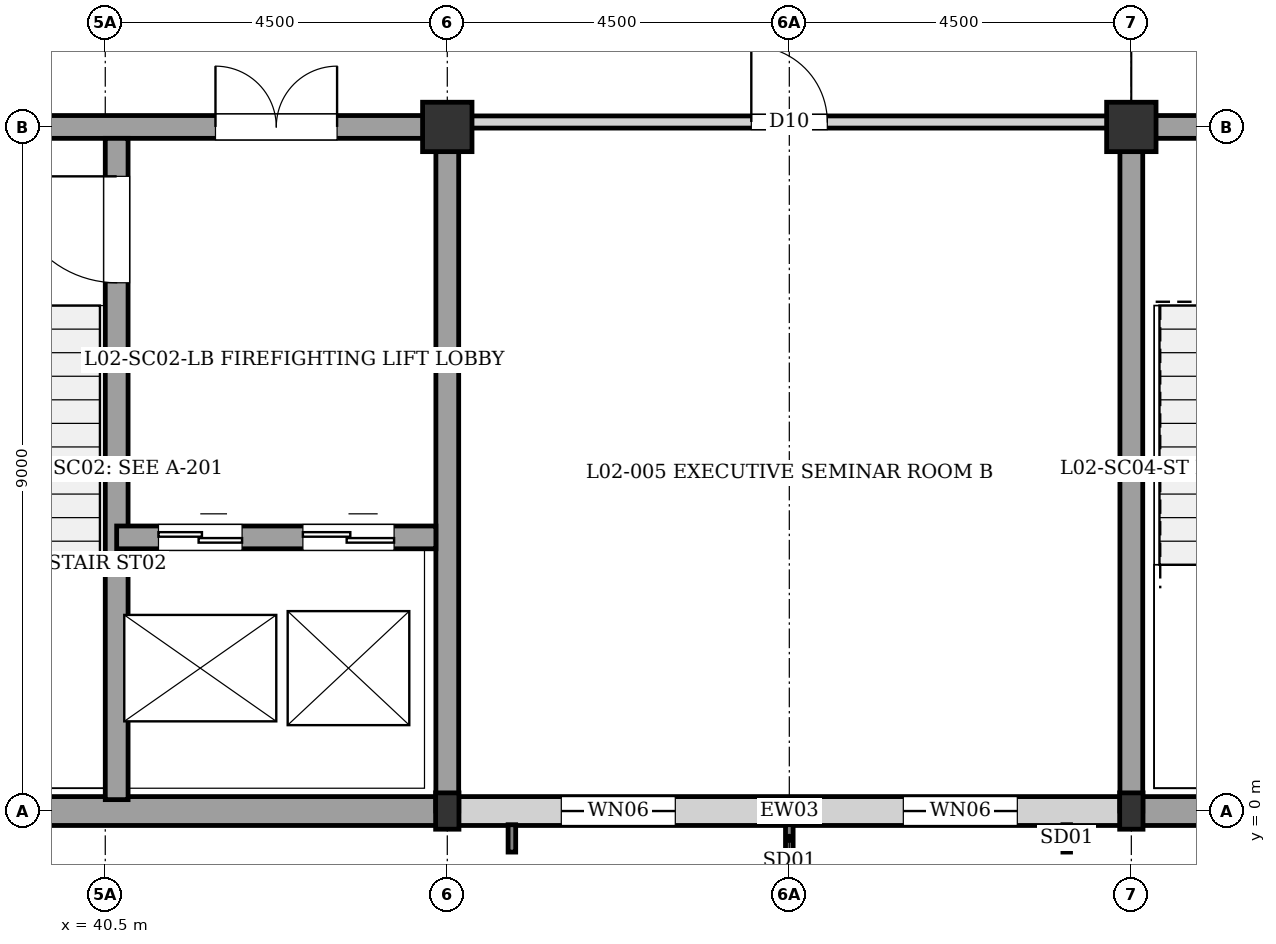
"""IFC4 building model, lengths in metres.
Left out: names, types, materials, properties, quantities, classifications, styles, units other than length and angle.
Written with IfcOpenShell. Run it as: python <this file> out.ifc"""

import sys

from ifc_helpers import new_model, si_unit, direction, frame, frame_2d, origin, origin_2d, place, context, subcontext, project, spatial, rectangle, i_section, extrude, element, fill, save


model = new_model("IFC4")
c1 = context("Model", 3, precision=1e-05, world=origin(), true_north=direction((0.0, 1.0)))
c2 = subcontext(c1, "Body", "Model", "MODEL_VIEW")
j1 = project(units=[si_unit("LENGTHUNIT", "METRE"), si_unit("PLANEANGLEUNIT", "RADIAN")], contexts=[c1])
p1 = place(None, origin())
s1 = spatial("IfcSite", under=j1, at=p1, CompositionType="ELEMENT")
p2 = place(p1, origin())
s2 = spatial("IfcBuilding", under=s1, at=p2, CompositionType="ELEMENT")
p3 = place(p2, frame((0.0, 0.0, 8.16)))
s3 = spatial("IfcBuildingStorey", under=s2, at=p3, CompositionType="ELEMENT", Elevation=8.16)
p4 = place(p3, frame((45.0, 0.0, 0.0), z_axis=(0.0, 0.0, 1.0), x_axis=(1.0, 0.0, 0.0)))
e1 = element("IfcColumn", 1, at=p4, inside=s3, PredefinedType="COLUMN", context=c2, shape_type="SweptSolid", body=[
    extrude(i_section(OverallWidth=0.307, OverallDepth=0.478, WebThickness=0.021, FlangeThickness=0.04, at=origin_2d()), origin(), (0.0, 0.0, 1.0), 3.36),
])
p5 = place(p3, frame((45.0, 9.0, 0.0), z_axis=(0.0, 0.0, 1.0), x_axis=(1.0, 0.0, 0.0)))
e2 = element("IfcColumn", 2, at=p5, inside=s3, PredefinedType="COLUMN", context=c2, shape_type="SweptSolid", body=[
    extrude(rectangle(XDim=0.65, YDim=0.65, at=origin_2d()), origin(), (0.0, 0.0, 1.0), 3.36),
])
p6 = place(p3, frame((54.0, 0.0, 0.0), z_axis=(0.0, 0.0, 1.0), x_axis=(1.0, 0.0, 0.0)))
e3 = element("IfcColumn", 3, at=p6, inside=s3, PredefinedType="COLUMN", context=c2, shape_type="SweptSolid", body=[
    extrude(i_section(OverallWidth=0.307, OverallDepth=0.478, WebThickness=0.021, FlangeThickness=0.04, at=origin_2d()), origin(), (0.0, 0.0, 1.0), 3.36),
])
p7 = place(p3, frame((54.0, 9.0, 0.0), z_axis=(0.0, 0.0, 1.0), x_axis=(1.0, 0.0, 0.0)))
e4 = element("IfcColumn", 4, at=p7, inside=s3, PredefinedType="COLUMN", context=c2, shape_type="SweptSolid", body=[
    extrude(rectangle(XDim=0.65, YDim=0.65, at=origin_2d()), origin(), (0.0, 0.0, 1.0), 3.36),
])
p8 = place(p3, frame((63.0, 0.0, 0.0), z_axis=(0.0, 0.0, 1.0), x_axis=(-1.0, 0.0, 0.0)))
e5 = element("IfcWall", 5, at=p8, inside=s3, PredefinedType="SOLIDWALL", context=c2, shape_type="SweptSolid", body=[
    extrude(rectangle(XDim=9.0, YDim=0.38, at=frame_2d((4.5, 0.0))), origin(), (0.0, 0.0, 1.0), 3.14),
])
p9 = place(p3, frame((53.87, 0.0, 0.0), z_axis=(0.0, 0.0, 1.0), x_axis=(-1.0, 0.0, 0.0)))
e6 = element("IfcWall", 6, at=p9, inside=s3, PredefinedType="SOLIDWALL", context=c2, shape_type="SweptSolid", body=[
    extrude(rectangle(XDim=8.74, YDim=0.38, at=frame_2d((4.37, 0.0))), origin(), (0.0, 0.0, 1.0), 2.8),
])
p10 = place(p9, frame((1.37, 0.0, 0.35)))
e7 = element("IfcOpeningElement", 7, at=p10, cuts=e6, PredefinedType="OPENING", context=c2, shape_type="SweptSolid", body=[
    extrude(rectangle(XDim=1.5, YDim=1.8, at=frame_2d((0.75, 0.9))), frame((0.0, 0.2, 0.0), z_axis=(0.0, -1.0, 0.0), x_axis=(1.0, 0.0, 0.0)), (0.0, 0.0, 1.0), 0.4),
])
p11 = place(p9, frame((5.87, 0.0, 0.35)))
e8 = element("IfcOpeningElement", 8, at=p11, cuts=e6, PredefinedType="OPENING", context=c2, shape_type="SweptSolid", body=[
    extrude(rectangle(XDim=1.5, YDim=1.8, at=frame_2d((0.75, 0.9))), frame((0.0, 0.2, 0.0), z_axis=(0.0, -1.0, 0.0), x_axis=(1.0, 0.0, 0.0)), (0.0, 0.0, 1.0), 0.4),
])
p12 = place(p3, frame((45.0, 0.0, 0.0), z_axis=(0.0, 0.0, 1.0), x_axis=(-1.0, 0.0, 0.0)))
e9 = element("IfcWall", 9, at=p12, inside=s3, PredefinedType="SOLIDWALL", context=c2, shape_type="SweptSolid", body=[
    extrude(rectangle(XDim=9.0, YDim=0.38, at=frame_2d((4.5, 0.0))), origin(), (0.0, 0.0, 1.0), 3.14),
])
p13 = place(p3, frame((45.0, 0.0, 0.0), z_axis=(0.0, 0.0, 1.0), x_axis=(0.0, 1.0, 0.0)))
e10 = element("IfcWall", 10, at=p13, inside=s3, PredefinedType="SHEAR", context=c2, shape_type="SweptSolid", body=[
    extrude(rectangle(XDim=9.0, YDim=0.3, at=frame_2d((4.5, 0.0))), origin(), (0.0, 0.0, 1.0), 3.14),
])
p14 = place(p3, frame((36.0, 9.0, 0.0), z_axis=(0.0, 0.0, 1.0), x_axis=(1.0, 0.0, 0.0)))
e11 = element("IfcWall", 11, at=p14, inside=s3, PredefinedType="SHEAR", context=c2, shape_type="SweptSolid", body=[
    extrude(rectangle(XDim=9.0, YDim=0.3, at=frame_2d((4.5, 0.0))), origin(), (0.0, 0.0, 1.0), 3.14),
])
p15 = place(p14, frame((5.95, 0.0, 0.0)))
e12 = element("IfcOpeningElement", 12, at=p15, cuts=e11, PredefinedType="OPENING", context=c2, shape_type="SweptSolid", body=[
    extrude(rectangle(XDim=1.6, YDim=2.1, at=frame_2d((0.8, 1.05))), frame((0.0, 0.16, 0.0), z_axis=(0.0, -1.0, 0.0), x_axis=(1.0, 0.0, 0.0)), (0.0, 0.0, 1.0), 0.32),
])
p16 = place(p3, frame((40.65, 0.15, 0.0), z_axis=(0.0, 0.0, 1.0), x_axis=(0.0, 1.0, 0.0)))
e13 = element("IfcWall", 13, at=p16, inside=s3, PredefinedType="SHEAR", context=c2, shape_type="SweptSolid", body=[
    extrude(rectangle(XDim=8.7, YDim=0.3, at=frame_2d((4.35, 0.0))), origin(), (0.0, 0.0, 1.0), 3.14),
])
p17 = place(p16, frame((6.8, 0.0, 0.0)))
e14 = element("IfcOpeningElement", 14, at=p17, cuts=e13, PredefinedType="OPENING", context=c2, shape_type="SweptSolid", body=[
    extrude(rectangle(XDim=1.4, YDim=2.02, at=frame_2d((0.7, 1.01))), frame((0.0, 0.16, 0.0), z_axis=(0.0, -1.0, 0.0), x_axis=(1.0, 0.0, 0.0)), (0.0, 0.0, 1.0), 0.32),
])
p18 = place(p3, frame((40.65, 3.6, 0.0), z_axis=(0.0, 0.0, 1.0), x_axis=(1.0, 0.0, 0.0)))
e15 = element("IfcWall", 15, at=p18, inside=s3, PredefinedType="SHEAR", context=c2, shape_type="SweptSolid", body=[
    extrude(rectangle(XDim=4.2, YDim=0.3, at=frame_2d((2.1, 0.0))), origin(), (0.0, 0.0, 1.0), 3.14),
])
p19 = place(p18, frame((0.55, 0.0, 0.0)))
e16 = element("IfcOpeningElement", 16, at=p19, cuts=e15, PredefinedType="OPENING", context=c2, shape_type="SweptSolid", body=[
    extrude(rectangle(XDim=1.1, YDim=2.1, at=frame_2d((0.55, 1.05))), frame((0.0, 0.16, 0.0), z_axis=(0.0, -1.0, 0.0), x_axis=(1.0, 0.0, 0.0)), (0.0, 0.0, 1.0), 0.32),
])
p20 = place(p18, frame((2.45, 0.0, 0.0)))
e17 = element("IfcOpeningElement", 17, at=p20, cuts=e15, PredefinedType="OPENING", context=c2, shape_type="SweptSolid", body=[
    extrude(rectangle(XDim=1.2, YDim=2.2, at=frame_2d((0.6, 1.1))), frame((0.0, 0.16, 0.0), z_axis=(0.0, -1.0, 0.0), x_axis=(1.0, 0.0, 0.0)), (0.0, 0.0, 1.0), 0.32),
])
p21 = place(p3, frame((54.0, 9.0, 0.0), z_axis=(0.0, 0.0, 1.0), x_axis=(1.0, 0.0, 0.0)))
e18 = element("IfcWall", 18, at=p21, inside=s3, PredefinedType="SHEAR", context=c2, shape_type="SweptSolid", body=[
    extrude(rectangle(XDim=9.0, YDim=0.3, at=frame_2d((4.5, 0.0))), origin(), (0.0, 0.0, 1.0), 3.14),
])
p22 = place(p21, frame((6.05, 0.0, 0.0)))
e19 = element("IfcOpeningElement", 19, at=p22, cuts=e18, PredefinedType="OPENING", context=c2, shape_type="SweptSolid", body=[
    extrude(rectangle(XDim=1.4, YDim=2.02, at=frame_2d((0.7, 1.01))), frame((0.0, 0.16, 0.0), z_axis=(0.0, -1.0, 0.0), x_axis=(1.0, 0.0, 0.0)), (0.0, 0.0, 1.0), 0.32),
])
p23 = place(p3, frame((54.0, 0.0, 0.0), z_axis=(0.0, 0.0, 1.0), x_axis=(0.0, 1.0, 0.0)))
e20 = element("IfcWall", 20, at=p23, inside=s3, PredefinedType="SHEAR", context=c2, shape_type="SweptSolid", body=[
    extrude(rectangle(XDim=9.0, YDim=0.3, at=frame_2d((4.5, 0.0))), origin(), (0.0, 0.0, 1.0), 3.14),
])
p24 = place(p3, frame((45.155, 9.065, 0.0), z_axis=(0.0, 0.0, 1.0), x_axis=(1.0, 0.0, 0.0)))
e21 = element("IfcWall", 21, at=p24, inside=s3, PredefinedType="PARTITIONING", context=c2, shape_type="SweptSolid", body=[
    extrude(rectangle(XDim=8.69, YDim=0.16, at=frame_2d((4.345, 0.0))), origin(), (0.0, 0.0, 1.0), 2.66),
])
p25 = place(p24, frame((3.845, 0.0, 0.0)))
e22 = element("IfcOpeningElement", 22, at=p25, cuts=e21, PredefinedType="OPENING", context=c2, shape_type="SweptSolid", body=[
    extrude(rectangle(XDim=1.0, YDim=2.1, at=frame_2d((0.5, 1.05))), frame((0.0, 0.09, 0.0), z_axis=(0.0, -1.0, 0.0), x_axis=(1.0, 0.0, 0.0)), (0.0, 0.0, 1.0), 0.18),
])
p26 = place(p10, origin())
e23 = element("IfcWindow", 23, at=p26, inside=s3, PartitioningType="SINGLE_PANEL", PredefinedType="WINDOW", context=c2, shape_type="SweptSolid", body=[
    extrude(rectangle(XDim=1.5, YDim=1.8, at=frame_2d((0.75, 0.9))), frame((0.0, 0.03, 0.0), z_axis=(0.0, -1.0, 0.0), x_axis=(1.0, 0.0, 0.0)), (0.0, 0.0, 1.0), 0.06),
])
fill(e7, e23)
p27 = place(p11, origin())
e24 = element("IfcWindow", 24, at=p27, inside=s3, PartitioningType="SINGLE_PANEL", PredefinedType="WINDOW", context=c2, shape_type="SweptSolid", body=[
    extrude(rectangle(XDim=1.5, YDim=1.8, at=frame_2d((0.75, 0.9))), frame((0.0, 0.03, 0.0), z_axis=(0.0, -1.0, 0.0), x_axis=(1.0, 0.0, 0.0)), (0.0, 0.0, 1.0), 0.06),
])
fill(e8, e24)
p28 = place(p15, origin())
e25 = element("IfcDoor", 25, at=p28, inside=s3, OperationType="DOUBLE_DOOR_SINGLE_SWING", PredefinedType="DOOR", context=c2, shape_type="SweptSolid", body=[
    extrude(rectangle(XDim=1.6, YDim=2.1, at=frame_2d((0.8, 1.05))), frame((0.0, 0.025, 0.0), z_axis=(0.0, -1.0, 0.0), x_axis=(1.0, 0.0, 0.0)), (0.0, 0.0, 1.0), 0.05),
])
fill(e12, e25)
p29 = place(p17, origin())
e26 = element("IfcDoor", 26, at=p29, inside=s3, OperationType="SINGLE_SWING_RIGHT", PredefinedType="DOOR", context=c2, shape_type="SweptSolid", body=[
    extrude(rectangle(XDim=1.4, YDim=2.02, at=frame_2d((0.7, 1.01))), frame((0.0, 0.025, 0.0), z_axis=(0.0, -1.0, 0.0), x_axis=(1.0, 0.0, 0.0)), (0.0, 0.0, 1.0), 0.05),
])
fill(e14, e26)
p30 = place(p19, origin())
e27 = element("IfcDoor", 27, at=p30, inside=s3, OperationType="DOUBLE_DOOR_SLIDING", PredefinedType="DOOR", context=c2, shape_type="SweptSolid", body=[
    extrude(rectangle(XDim=1.1, YDim=2.1, at=frame_2d((0.55, 1.05))), frame((0.0, 0.025, 0.0), z_axis=(0.0, -1.0, 0.0), x_axis=(1.0, 0.0, 0.0)), (0.0, 0.0, 1.0), 0.05),
])
fill(e16, e27)
p31 = place(p20, origin())
e28 = element("IfcDoor", 28, at=p31, inside=s3, OperationType="DOUBLE_DOOR_SLIDING", PredefinedType="DOOR", context=c2, shape_type="SweptSolid", body=[
    extrude(rectangle(XDim=1.2, YDim=2.2, at=frame_2d((0.6, 1.1))), frame((0.0, 0.025, 0.0), z_axis=(0.0, -1.0, 0.0), x_axis=(1.0, 0.0, 0.0)), (0.0, 0.0, 1.0), 0.05),
])
fill(e17, e28)
p32 = place(p25, origin())
e29 = element("IfcDoor", 29, at=p32, inside=s3, OperationType="SINGLE_SWING_LEFT", PredefinedType="DOOR", context=c2, shape_type="SweptSolid", body=[
    extrude(rectangle(XDim=1.0, YDim=2.1, at=frame_2d((0.5, 1.05))), frame((0.0, 0.025, 0.0), z_axis=(0.0, -1.0, 0.0), x_axis=(1.0, 0.0, 0.0)), (0.0, 0.0, 1.0), 0.05),
])
fill(e22, e29)
save(model, sys.argv[1])
